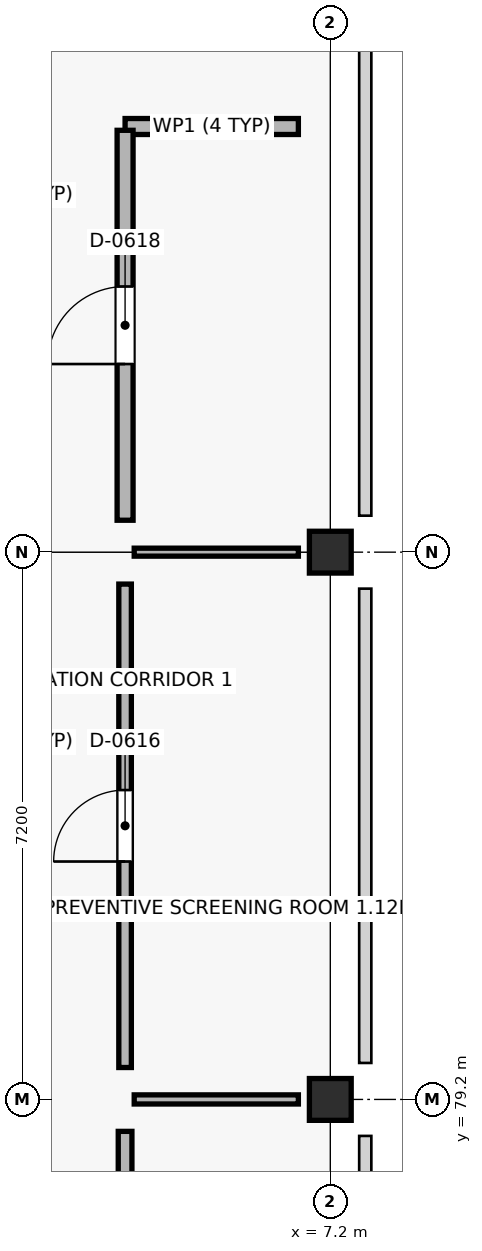
"""IFC4 building model, lengths in metres.
Left out: names, types, materials, properties, quantities, classifications, styles, units other than length and angle.
Written with IfcOpenShell. Run it as: python <this file> out.ifc"""

import sys

from ifc_helpers import new_model, si_unit, direction, frame, frame_2d, origin, origin_2d, place, context, subcontext, project, spatial, rectangle, extrude, element, fill, save


model = new_model("IFC4")
c1 = context("Model", 3, precision=1e-05, world=origin(), true_north=direction((0.0, 1.0)))
c2 = subcontext(c1, "Body", "Model", "MODEL_VIEW")
j1 = project(units=[si_unit("LENGTHUNIT", "METRE"), si_unit("PLANEANGLEUNIT", "RADIAN")], contexts=[c1])
p1 = place(None, origin())
s1 = spatial("IfcSite", under=j1, at=p1, CompositionType="ELEMENT")
p2 = place(p1, origin())
s2 = spatial("IfcBuilding", under=s1, at=p2, CompositionType="ELEMENT")
p3 = place(p2, frame((0.0, 0.0, 17.55)))
s3 = spatial("IfcBuildingStorey", under=s2, at=p3, CompositionType="ELEMENT", Elevation=17.55)
for number, where, z_axis, x_axis in (
    (1, (7.2, 79.2, 0.0), (0.0, 0.0, 1.0), (1.0, 0.0, 0.0)),
    (2, (7.2, 86.4, 0.0), (0.0, 0.0, 1.0), (1.0, 0.0, 0.0)),
):
    element("IfcColumn", number, at=place(p3, frame(where, z_axis=z_axis, x_axis=x_axis)), inside=s3, PredefinedType="COLUMN", context=c2, shape_type="SweptSolid", body=[
        extrude(rectangle(XDim=0.55, YDim=0.55, at=origin_2d()), origin(), (0.0, 0.0, 1.0), 4.05),
    ])
p4 = place(p3, frame((4.5, 72.42, 0.0), z_axis=(0.0, 0.0, 1.0), x_axis=(0.0, 1.0, 0.0)))
e3 = element("IfcWall", 3, at=p4, inside=s3, PredefinedType="PARTITIONING", context=c2, shape_type="SweptSolid", body=[
    extrude(rectangle(XDim=6.36, YDim=0.18, at=frame_2d((3.18, 0.0))), origin(), (0.0, 0.0, 1.0), 2.94),
])
p5 = place(p4, frame((2.43, 0.0, 0.0)))
e4 = element("IfcOpeningElement", 4, at=p5, cuts=e3, PredefinedType="OPENING", context=c2, shape_type="SweptSolid", body=[
    extrude(rectangle(XDim=1.5, YDim=2.14, at=frame_2d((0.75, 1.07))), frame((0.0, 0.1, 0.0), z_axis=(0.0, -1.0, 0.0), x_axis=(1.0, 0.0, 0.0)), (0.0, 0.0, 1.0), 0.2),
])
p6 = place(p3, frame((4.62, 79.2, 0.0), z_axis=(0.0, 0.0, 1.0), x_axis=(1.0, 0.0, 0.0)))
e5 = element("IfcWall", 5, at=p6, inside=s3, PredefinedType="PARTITIONING", context=c2, shape_type="SweptSolid", body=[
    extrude(rectangle(XDim=2.16, YDim=0.12, at=frame_2d((1.08, 0.0))), origin(), (0.0, 0.0, 1.0), 2.94),
])
p7 = place(p3, frame((4.5, 79.62, 0.0), z_axis=(0.0, 0.0, 1.0), x_axis=(0.0, 1.0, 0.0)))
e6 = element("IfcWall", 6, at=p7, inside=s3, PredefinedType="PARTITIONING", context=c2, shape_type="SweptSolid", body=[
    extrude(rectangle(XDim=6.36, YDim=0.165, at=frame_2d((3.18, 0.0))), origin(), (0.0, 0.0, 1.0), 2.94),
])
p8 = place(p7, frame((2.71, 0.0, 0.0)))
e7 = element("IfcOpeningElement", 7, at=p8, cuts=e6, PredefinedType="OPENING", context=c2, shape_type="SweptSolid", body=[
    extrude(rectangle(XDim=0.94, YDim=2.19, at=frame_2d((0.47, 1.095))), frame((0.0, 0.093, 0.0), z_axis=(0.0, -1.0, 0.0), x_axis=(1.0, 0.0, 0.0)), (0.0, 0.0, 1.0), 0.185),
])
p9 = place(p3, frame((4.62, 86.4, 0.0), z_axis=(0.0, 0.0, 1.0), x_axis=(1.0, 0.0, 0.0)))
e8 = element("IfcWall", 8, at=p9, inside=s3, PredefinedType="PARTITIONING", context=c2, shape_type="SweptSolid", body=[
    extrude(rectangle(XDim=2.16, YDim=0.105, at=frame_2d((1.08, 0.0))), origin(), (0.0, 0.0, 1.0), 2.94),
])
p10 = place(p3, frame((4.5, 92.0, 0.0), z_axis=(0.0, 0.0, 1.0), x_axis=(1.0, 0.0, 0.0)))
e9 = element("IfcWall", 9, at=p10, inside=s3, PredefinedType="PLUMBINGWALL", context=c2, shape_type="SweptSolid", body=[
    extrude(rectangle(XDim=2.28, YDim=0.21, at=frame_2d((1.14, 0.0))), origin(), (0.0, 0.0, 1.0), 2.94),
])
p11 = place(p3, frame((4.5, 86.82, 0.0), z_axis=(0.0, 0.0, 1.0), x_axis=(0.0, 1.0, 0.0)))
e10 = element("IfcWall", 10, at=p11, inside=s3, PredefinedType="PLUMBINGWALL", context=c2, shape_type="SweptSolid", body=[
    extrude(rectangle(XDim=5.13, YDim=0.21, at=frame_2d((2.565, 0.0))), origin(), (0.0, 0.0, 1.0), 2.94),
])
p12 = place(p11, frame((2.055, 0.0, 0.0)))
e11 = element("IfcOpeningElement", 11, at=p12, cuts=e10, PredefinedType="OPENING", context=c2, shape_type="SweptSolid", body=[
    extrude(rectangle(XDim=1.02, YDim=2.19, at=frame_2d((0.51, 1.095))), frame((0.0, 0.115, 0.0), z_axis=(0.0, -1.0, 0.0), x_axis=(1.0, 0.0, 0.0)), (0.0, 0.0, 1.0), 0.23),
])
p13 = place(p8, origin())
e12 = element("IfcDoor", 12, at=p13, inside=s3, OperationType="SINGLE_SWING_LEFT", PredefinedType="DOOR", context=c2, shape_type="SweptSolid", body=[
    extrude(rectangle(XDim=0.94, YDim=2.19, at=frame_2d((0.47, 1.095))), frame((0.0, 0.025, 0.0), z_axis=(0.0, -1.0, 0.0), x_axis=(1.0, 0.0, 0.0)), (0.0, 0.0, 1.0), 0.05),
])
fill(e7, e12)
p14 = place(p12, origin())
e13 = element("IfcDoor", 13, at=p14, inside=s3, OperationType="SINGLE_SWING_LEFT", PredefinedType="DOOR", context=c2, shape_type="SweptSolid", body=[
    extrude(rectangle(XDim=1.02, YDim=2.19, at=frame_2d((0.51, 1.095))), frame((0.0, 0.025, 0.0), z_axis=(0.0, -1.0, 0.0), x_axis=(1.0, 0.0, 0.0)), (0.0, 0.0, 1.0), 0.05),
])
fill(e11, e13)
save(model, sys.argv[1])
